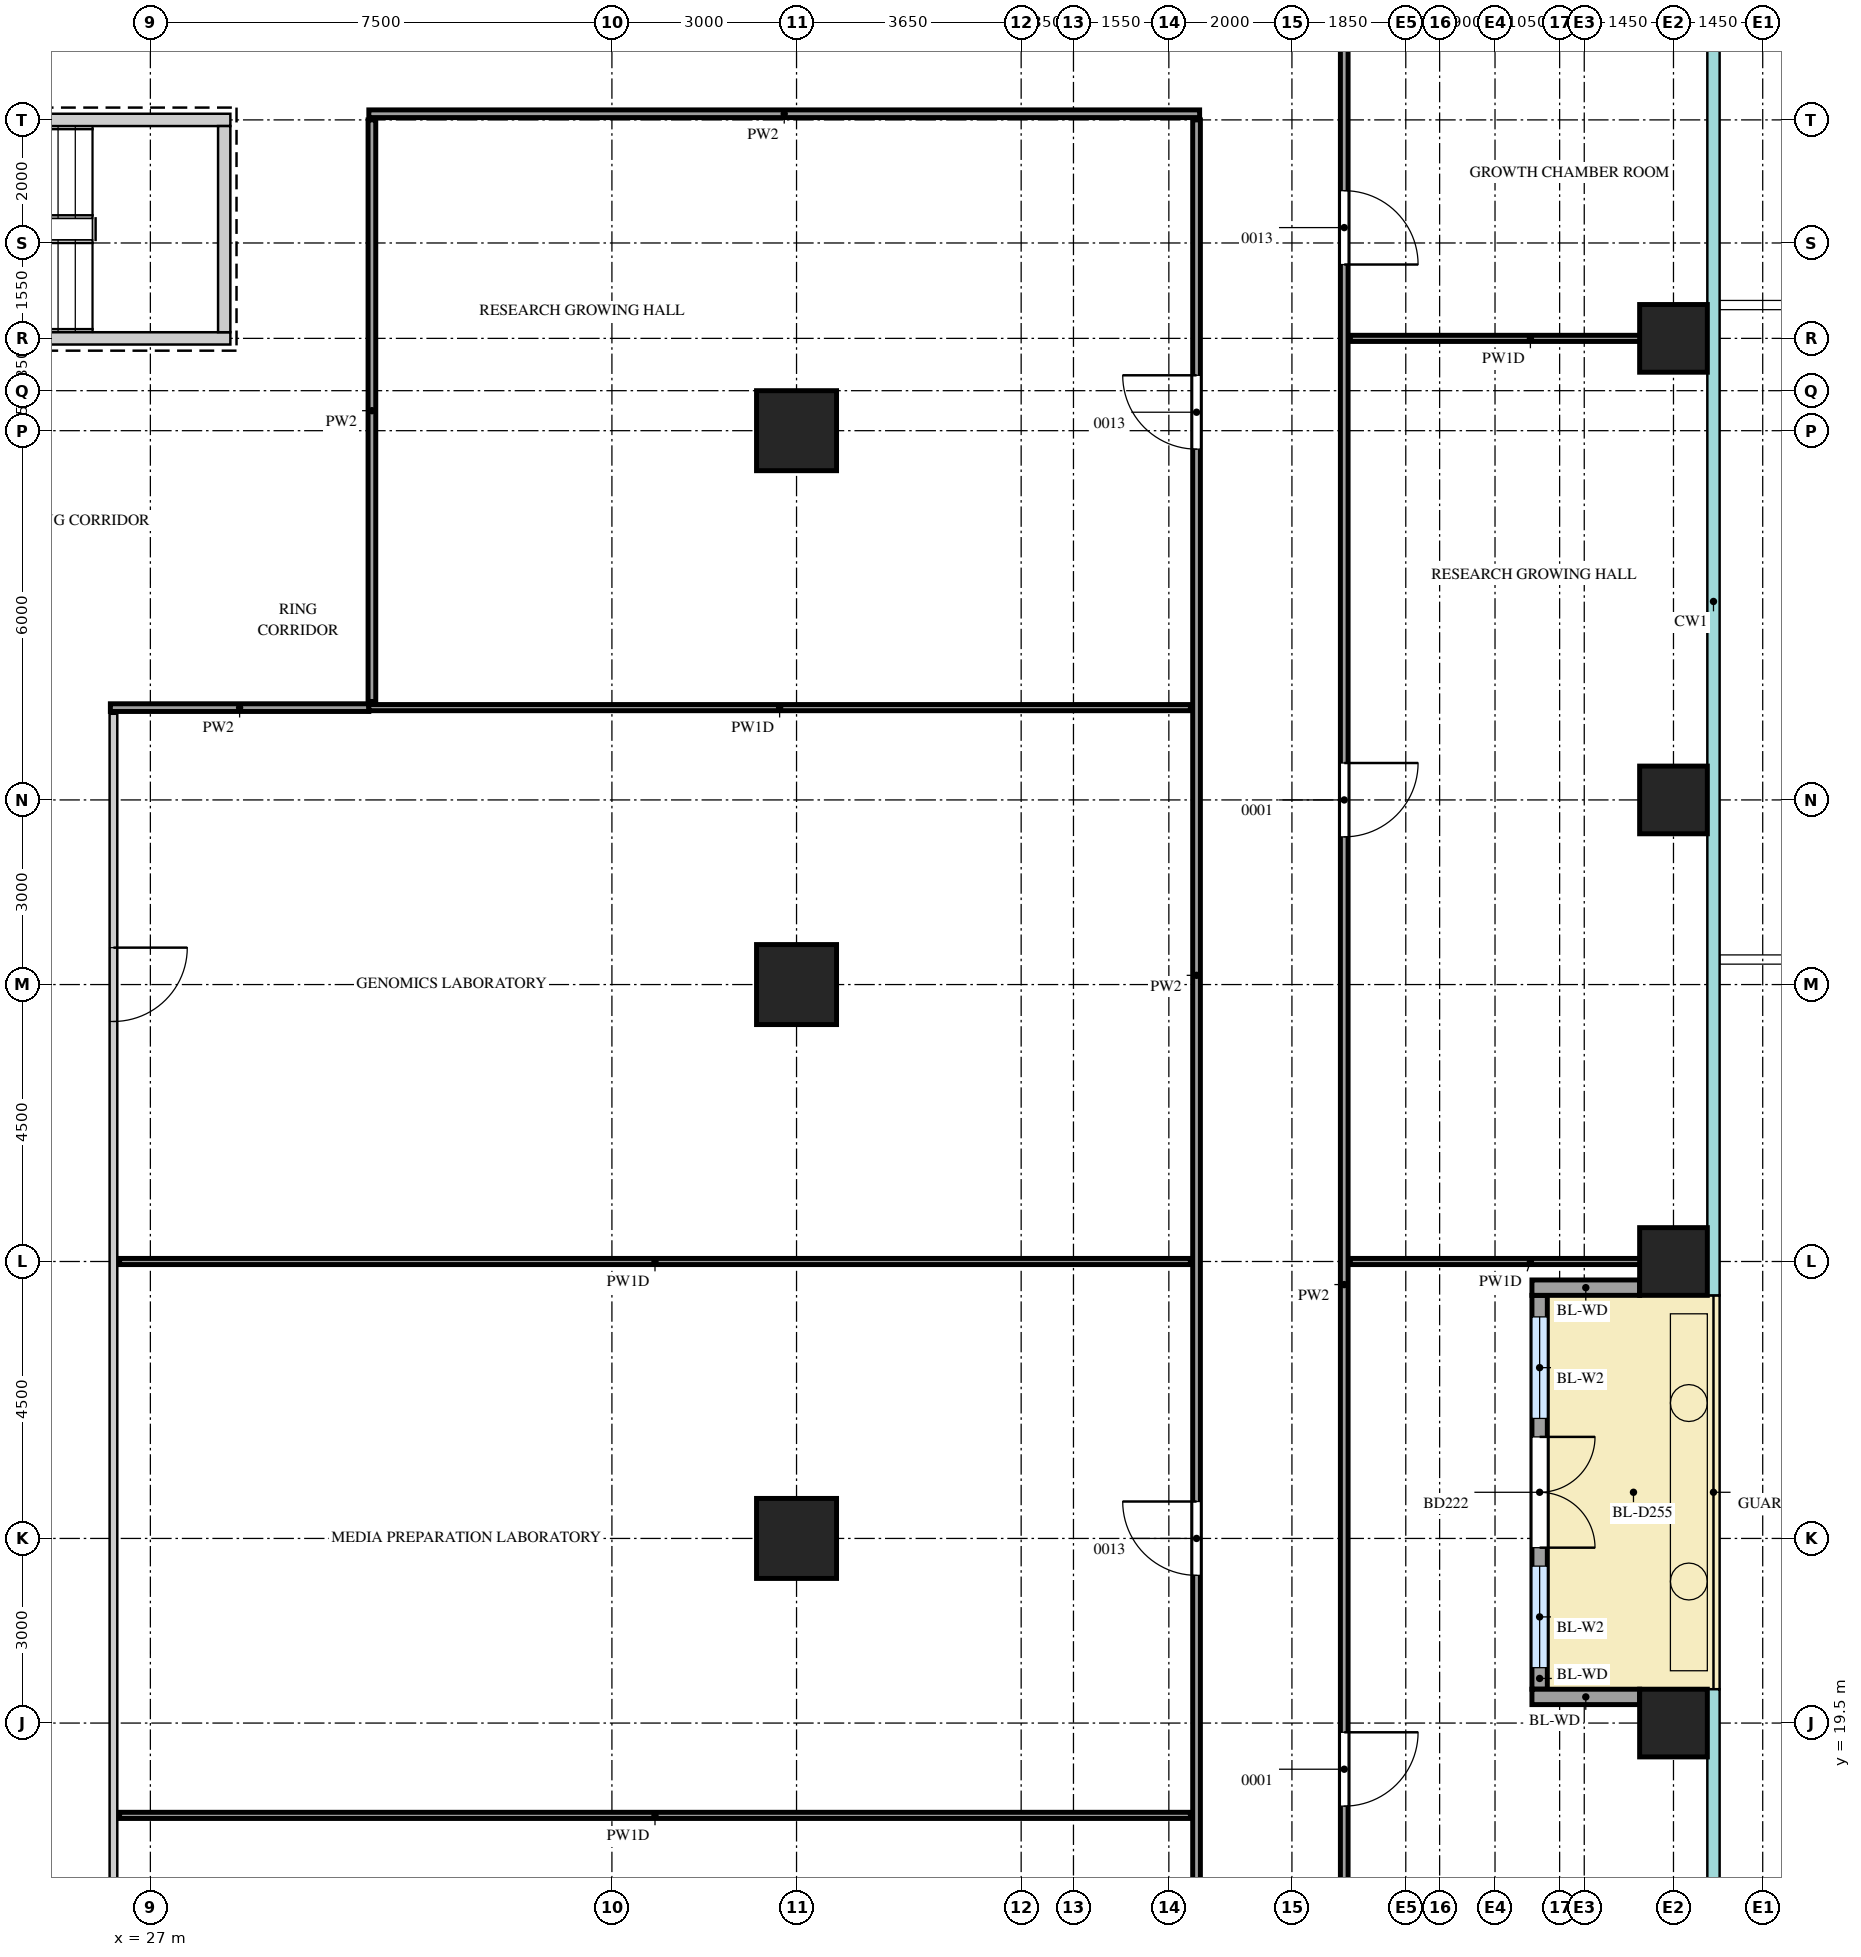
"""IFC4 building model, lengths in metres.
Left out: names, types, materials, properties, quantities, classifications, styles, units other than length and angle.
Written with IfcOpenShell. Run it as: python <this file> out.ifc"""

import sys

from ifc_helpers import new_model, si_unit, direction, frame, frame_2d, origin, origin_2d, place, context, subcontext, project, spatial, rectangle, extrude, source, transform, mapped, element, fill, save


model = new_model("IFC4")
c1 = context("Model", 3, precision=1e-05, world=origin(), true_north=direction((0.0, 1.0)))
c2 = subcontext(c1, "Body", "Model", "MODEL_VIEW")
j1 = project(units=[si_unit("LENGTHUNIT", "METRE"), si_unit("PLANEANGLEUNIT", "RADIAN")], contexts=[c1])
p1 = place(None, origin())
s1 = spatial("IfcSite", under=j1, at=p1, CompositionType="ELEMENT")
p2 = place(p1, origin())
s2 = spatial("IfcBuilding", under=s1, at=p2, CompositionType="ELEMENT")
p3 = place(p2, frame((0.0, 0.0, 105.9)))
s3 = spatial("IfcBuildingStorey", under=s2, at=p3, CompositionType="ELEMENT", Elevation=105.9)
m1 = source(origin(), c2, "Body", "SweptSolid", [
    extrude(rectangle(XDim=7.1, YDim=0.2, at=frame_2d((3.55, 0.0))), origin(), (0.0, 0.0, 1.0), 4.1),
])
p4 = place(p3, frame((21.2, 45.55, 0.0), z_axis=(0.0, 0.0, 1.0), x_axis=(1.0, 0.0, 0.0)))
e1 = element("IfcWall", 1, at=p4, inside=s3, PredefinedType="SHEAR", context=c2, shape_type="MappedRepresentation", body=[
    mapped(m1, transform((0.0, 0.0, 0.0))),
])
m2 = source(origin(), c2, "Body", "SweptSolid", [
    extrude(rectangle(XDim=1.2, YDim=2.1, at=frame_2d((0.6, 1.05))), frame((0.0, 0.11, 0.0), z_axis=(0.0, -1.0, 0.0), x_axis=(1.0, 0.0, 0.0)), (0.0, 0.0, 1.0), 0.22),
])
p5 = place(p4, frame((0.15, 0.0, 0.0)))
e2 = element("IfcOpeningElement", 2, at=p5, cuts=e1, PredefinedType="OPENING", context=c2, shape_type="MappedRepresentation", body=[
    mapped(m2, transform((0.0, 0.0, 0.0))),
])
p6 = place(p3, frame((21.2, 42.0, 0.0), z_axis=(0.0, 0.0, 1.0), x_axis=(1.0, 0.0, 0.0)))
e3 = element("IfcWall", 3, at=p6, inside=s3, PredefinedType="SHEAR", context=c2, shape_type="MappedRepresentation", body=[
    mapped(m1, transform((0.0, 0.0, 0.0))),
])
m3 = source(origin(), c2, "Body", "SweptSolid", [
    extrude(rectangle(XDim=3.35, YDim=0.2, at=frame_2d((1.675, 0.0))), origin(), (0.0, 0.0, 1.0), 4.1),
])
p7 = place(p3, frame((28.2, 42.1, 0.0), z_axis=(0.0, 0.0, 1.0), x_axis=(0.0, 1.0, 0.0)))
e4 = element("IfcWall", 4, at=p7, inside=s3, PredefinedType="SHEAR", context=c2, shape_type="MappedRepresentation", body=[
    mapped(m3, transform((0.0, 0.0, 0.0))),
])
m4 = source(origin(), c2, "Body", "SweptSolid", [
    extrude(rectangle(XDim=1.1, YDim=1.1, at=origin_2d()), origin(), (0.0, 0.0, 1.0), 4.1),
])
for number, where, z_axis, x_axis in (
    (5, (51.75, 19.5, 0.0), (0.0, 0.0, 1.0), (1.0, 0.0, 0.0)),
    (6, (51.75, 27.0, 0.0), (0.0, 0.0, 1.0), (1.0, 0.0, 0.0)),
    (7, (51.75, 34.5, 0.0), (0.0, 0.0, 1.0), (1.0, 0.0, 0.0)),
    (8, (51.75, 42.0, 0.0), (0.0, 0.0, 1.0), (1.0, 0.0, 0.0)),
):
    element("IfcColumn", number, at=place(p3, frame(where, z_axis=z_axis, x_axis=x_axis)), inside=s3, PredefinedType="COLUMN", context=c2, shape_type="MappedRepresentation", body=[
        mapped(m4, transform((0.0, 0.0, 0.0))),
    ])
m5 = source(origin(), c2, "Body", "SweptSolid", [
    extrude(rectangle(XDim=1.3, YDim=1.3, at=origin_2d()), origin(), (0.0, 0.0, 1.0), 4.1),
])
for number, where, z_axis, x_axis in (
    (9, (37.5, 22.5, 0.0), (0.0, 0.0, 1.0), (1.0, 0.0, 0.0)),
    (10, (37.5, 31.5, 0.0), (0.0, 0.0, 1.0), (1.0, 0.0, 0.0)),
    (11, (37.5, 40.5, 0.0), (0.0, 0.0, 1.0), (1.0, 0.0, 0.0)),
):
    element("IfcColumn", number, at=place(p3, frame(where, z_axis=z_axis, x_axis=x_axis)), inside=s3, PredefinedType="COLUMN", context=c2, shape_type="MappedRepresentation", body=[
        mapped(m5, transform((0.0, 0.0, 0.0))),
    ])
m6 = source(origin(), c2, "Body", "SweptSolid", [
    extrude(rectangle(XDim=6.4, YDim=0.25, at=frame_2d((3.2, 0.0))), origin(), (0.0, 0.0, 1.0), 3.55),
])
p8 = place(p3, frame((49.575, 20.05, 0.0), z_axis=(0.0, 0.0, 1.0), x_axis=(0.0, 1.0, 0.0)))
e12 = element("IfcWall", 12, at=p8, inside=s3, PredefinedType="SOLIDWALL", context=c2, shape_type="MappedRepresentation", body=[
    mapped(m6, transform((0.0, 0.0, 0.0))),
])
m7 = source(origin(), c2, "Body", "SweptSolid", [
    extrude(rectangle(XDim=1.65, YDim=2.4, at=frame_2d((0.825, 1.2))), frame((0.0, 0.135, 0.0), z_axis=(0.0, -1.0, 0.0), x_axis=(1.0, 0.0, 0.0)), (0.0, 0.0, 1.0), 0.27),
])
p9 = place(p8, frame((0.35, 0.0, 0.0)))
e13 = element("IfcOpeningElement", 13, at=p9, cuts=e12, PredefinedType="OPENING", context=c2, shape_type="MappedRepresentation", body=[
    mapped(m7, transform((0.0, 0.0, 0.0))),
])
p10 = place(p8, frame((4.4, 0.0, 0.0)))
e14 = element("IfcOpeningElement", 14, at=p10, cuts=e12, PredefinedType="OPENING", context=c2, shape_type="MappedRepresentation", body=[
    mapped(m7, transform((0.0, 0.0, 0.0))),
])
m8 = source(origin(), c2, "Body", "SweptSolid", [
    extrude(rectangle(XDim=1.8, YDim=2.4, at=frame_2d((0.9, 1.2))), frame((0.0, 0.135, 0.0), z_axis=(0.0, -1.0, 0.0), x_axis=(1.0, 0.0, 0.0)), (0.0, 0.0, 1.0), 0.27),
])
p11 = place(p8, frame((2.3, 0.0, 0.0)))
e15 = element("IfcOpeningElement", 15, at=p11, cuts=e12, PredefinedType="OPENING", context=c2, shape_type="MappedRepresentation", body=[
    mapped(m8, transform((0.0, 0.0, 0.0))),
])
m9 = source(origin(), c2, "Body", "SweptSolid", [
    extrude(rectangle(XDim=1.75, YDim=0.25, at=frame_2d((0.875, 0.0))), origin(), (0.0, 0.0, 1.0), 3.55),
])
for number, where, z_axis, x_axis in (
    (16, (51.2, 19.925, 0.0), (0.0, 0.0, 1.0), (-1.0, 0.0, 0.0)),
    (17, (51.2, 26.575, 0.0), (0.0, 0.0, 1.0), (-1.0, 0.0, 0.0)),
):
    element("IfcWall", number, at=place(p3, frame(where, z_axis=z_axis, x_axis=x_axis)), inside=s3, PredefinedType="SOLIDWALL", context=c2, shape_type="MappedRepresentation", body=[
        mapped(m9, transform((0.0, 0.0, 0.0))),
    ])
m10 = source(origin(), c2, "Body", "SweptSolid", [
    extrude(rectangle(XDim=37.65, YDim=0.125, at=frame_2d((18.825, 0.0))), origin(), (0.0, 0.0, 1.0), 4.2),
])
p12 = place(p3, frame((46.4, 10.3, 0.0), z_axis=(0.0, 0.0, 1.0), x_axis=(0.0, 1.0, 0.0)))
e18 = element("IfcWall", 18, at=p12, inside=s3, PredefinedType="PARTITIONING", context=c2, shape_type="MappedRepresentation", body=[
    mapped(m10, transform((0.0, 0.0, 0.0))),
])
m11 = source(origin(), c2, "Body", "SweptSolid", [
    extrude(rectangle(XDim=1.2, YDim=2.1, at=frame_2d((0.6, 1.05))), frame((0.0, 0.073, 0.0), z_axis=(0.0, -1.0, 0.0), x_axis=(1.0, 0.0, 0.0)), (0.0, 0.0, 1.0), 0.145),
])
p13 = place(p12, frame((7.85, 0.0, 0.0)))
e19 = element("IfcOpeningElement", 19, at=p13, cuts=e18, PredefinedType="OPENING", context=c2, shape_type="MappedRepresentation", body=[
    mapped(m11, transform((0.0, 0.0, 0.0))),
])
p14 = place(p12, frame((23.6, 0.0, 0.0)))
e20 = element("IfcOpeningElement", 20, at=p14, cuts=e18, PredefinedType="OPENING", context=c2, shape_type="MappedRepresentation", body=[
    mapped(m11, transform((0.0, 0.0, 0.0))),
])
p15 = place(p12, frame((32.9, 0.0, 0.0)))
e21 = element("IfcOpeningElement", 21, at=p15, cuts=e18, PredefinedType="OPENING", context=c2, shape_type="MappedRepresentation", body=[
    mapped(m11, transform((0.0, 0.0, 0.0))),
])
m12 = source(origin(), c2, "Body", "SweptSolid", [
    extrude(rectangle(XDim=23.2, YDim=0.125, at=frame_2d((11.6, 0.0))), origin(), (0.0, 0.0, 1.0), 4.2),
])
p16 = place(p3, frame((26.4, 12.7, 0.0), z_axis=(0.0, 0.0, 1.0), x_axis=(0.0, 1.0, 0.0)))
e22 = element("IfcWall", 22, at=p16, inside=s3, PredefinedType="PARTITIONING", context=c2, shape_type="MappedRepresentation", body=[
    mapped(m12, transform((0.0, 0.0, 0.0))),
])
m13 = source(origin(), c2, "Body", "SweptSolid", [
    extrude(rectangle(XDim=0.9, YDim=2.1, at=frame_2d((0.45, 1.05))), frame((0.0, 0.073, 0.0), z_axis=(0.0, -1.0, 0.0), x_axis=(1.0, 0.0, 0.0)), (0.0, 0.0, 1.0), 0.145),
])
p17 = place(p16, frame((2.15, 0.0, 0.0)))
e23 = element("IfcOpeningElement", 23, at=p17, cuts=e22, PredefinedType="OPENING", context=c2, shape_type="MappedRepresentation", body=[
    mapped(m13, transform((0.0, 0.0, 0.0))),
])
p18 = place(p16, frame((18.2, 0.0, 0.0)))
e24 = element("IfcOpeningElement", 24, at=p18, cuts=e22, PredefinedType="OPENING", context=c2, shape_type="MappedRepresentation", body=[
    mapped(m11, transform((0.0, 0.0, 0.0))),
])
m14 = source(origin(), c2, "Body", "SweptSolid", [
    extrude(rectangle(XDim=32.85, YDim=0.125, at=frame_2d((16.425, 0.0))), origin(), (0.0, 0.0, 1.0), 4.2),
])
p19 = place(p3, frame((44.0, 12.7, 0.0), z_axis=(0.0, 0.0, 1.0), x_axis=(0.0, 1.0, 0.0)))
e25 = element("IfcWall", 25, at=p19, inside=s3, PredefinedType="PARTITIONING", context=c2, shape_type="MappedRepresentation", body=[
    mapped(m14, transform((0.0, 0.0, 0.0))),
])
p20 = place(p19, frame((9.2, 0.0, 0.0)))
e26 = element("IfcOpeningElement", 26, at=p20, cuts=e25, PredefinedType="OPENING", context=c2, shape_type="MappedRepresentation", body=[
    mapped(m11, transform((0.0, 0.0, 0.0))),
])
p21 = place(p19, frame((27.5, 0.0, 0.0)))
e27 = element("IfcOpeningElement", 27, at=p21, cuts=e25, PredefinedType="OPENING", context=c2, shape_type="MappedRepresentation", body=[
    mapped(m11, transform((0.0, 0.0, 0.0))),
])
m15 = source(origin(), c2, "Body", "SweptSolid", [
    extrude(rectangle(XDim=17.4, YDim=0.1, at=frame_2d((8.7, 0.0))), origin(), (0.0, 0.0, 1.0), 4.2),
])
for number, where, z_axis, x_axis in (
    (28, (26.5, 18.0, 0.0), (0.0, 0.0, 1.0), (1.0, 0.0, 0.0)),
    (29, (26.5, 27.0, 0.0), (0.0, 0.0, 1.0), (1.0, 0.0, 0.0)),
):
    element("IfcWall", number, at=place(p3, frame(where, z_axis=z_axis, x_axis=x_axis)), inside=s3, PredefinedType="PARTITIONING", context=c2, shape_type="MappedRepresentation", body=[
        mapped(m15, transform((0.0, 0.0, 0.0))),
    ])
m16 = source(origin(), c2, "Body", "SweptSolid", [
    extrude(rectangle(XDim=5.85, YDim=0.1, at=frame_2d((2.925, 0.0))), origin(), (0.0, 0.0, 1.0), 4.2),
])
p22 = place(p3, frame((46.5, 27.0, 0.0), z_axis=(0.0, 0.0, 1.0), x_axis=(1.0, 0.0, 0.0)))
e30 = element("IfcWall", 30, at=p22, inside=s3, PredefinedType="PARTITIONING", context=c2, shape_type="MappedRepresentation", body=[
    mapped(m16, transform((0.0, 0.0, 0.0))),
])
m17 = source(origin(), c2, "Body", "SweptSolid", [
    extrude(rectangle(XDim=4.2, YDim=0.125, at=frame_2d((2.1, 0.0))), origin(), (0.0, 0.0, 1.0), 4.2),
])
p23 = place(p3, frame((26.35, 36.0, 0.0), z_axis=(0.0, 0.0, 1.0), x_axis=(1.0, 0.0, 0.0)))
e31 = element("IfcWall", 31, at=p23, inside=s3, PredefinedType="PARTITIONING", context=c2, shape_type="MappedRepresentation", body=[
    mapped(m17, transform((0.0, 0.0, 0.0))),
])
m18 = source(origin(), c2, "Body", "SweptSolid", [
    extrude(rectangle(XDim=13.35, YDim=0.1, at=frame_2d((6.675, 0.0))), origin(), (0.0, 0.0, 1.0), 4.2),
])
p24 = place(p3, frame((30.55, 36.0, 0.0), z_axis=(0.0, 0.0, 1.0), x_axis=(1.0, 0.0, 0.0)))
e32 = element("IfcWall", 32, at=p24, inside=s3, PredefinedType="PARTITIONING", context=c2, shape_type="MappedRepresentation", body=[
    mapped(m18, transform((0.0, 0.0, 0.0))),
])
m19 = source(origin(), c2, "Body", "SweptSolid", [
    extrude(rectangle(XDim=9.45, YDim=0.125, at=frame_2d((4.725, 0.0))), origin(), (0.0, 0.0, 1.0), 4.2),
])
p25 = place(p3, frame((30.6, 36.1, 0.0), z_axis=(0.0, 0.0, 1.0), x_axis=(0.0, 1.0, 0.0)))
e33 = element("IfcWall", 33, at=p25, inside=s3, PredefinedType="PARTITIONING", context=c2, shape_type="MappedRepresentation", body=[
    mapped(m19, transform((0.0, 0.0, 0.0))),
])
p26 = place(p3, frame((46.5, 42.0, 0.0), z_axis=(0.0, 0.0, 1.0), x_axis=(1.0, 0.0, 0.0)))
e34 = element("IfcWall", 34, at=p26, inside=s3, PredefinedType="PARTITIONING", context=c2, shape_type="MappedRepresentation", body=[
    mapped(m16, transform((0.0, 0.0, 0.0))),
])
m20 = source(origin(), c2, "Body", "SweptSolid", [
    extrude(rectangle(XDim=13.5, YDim=0.125, at=frame_2d((6.75, 0.0))), origin(), (0.0, 0.0, 1.0), 4.2),
])
p27 = place(p3, frame((30.55, 45.65, 0.0), z_axis=(0.0, 0.0, 1.0), x_axis=(1.0, 0.0, 0.0)))
e35 = element("IfcWall", 35, at=p27, inside=s3, PredefinedType="PARTITIONING", context=c2, shape_type="MappedRepresentation", body=[
    mapped(m20, transform((0.0, 0.0, 0.0))),
])
m21 = source(origin(), c2, "Body", "SweptSolid", [
    extrude(rectangle(XDim=1.65, YDim=2.4, at=frame_2d((0.825, 1.2))), frame((0.0, 0.03, 0.0), z_axis=(0.0, -1.0, 0.0), x_axis=(1.0, 0.0, 0.0)), (0.0, 0.0, 1.0), 0.06),
])
p28 = place(p9, origin())
e36 = element("IfcWindow", 36, at=p28, inside=s3, PartitioningType="SINGLE_PANEL", PredefinedType="WINDOW", context=c2, shape_type="MappedRepresentation", body=[
    mapped(m21, transform((0.0, 0.0, 0.0))),
])
fill(e13, e36)
p29 = place(p10, origin())
e37 = element("IfcWindow", 37, at=p29, inside=s3, PartitioningType="SINGLE_PANEL", PredefinedType="WINDOW", context=c2, shape_type="MappedRepresentation", body=[
    mapped(m21, transform((0.0, 0.0, 0.0))),
])
fill(e14, e37)
m22 = source(origin(), c2, "Body", "SweptSolid", [
    extrude(rectangle(XDim=1.8, YDim=2.4, at=frame_2d((0.9, 1.2))), frame((0.0, 0.025, 0.0), z_axis=(0.0, -1.0, 0.0), x_axis=(1.0, 0.0, 0.0)), (0.0, 0.0, 1.0), 0.05),
])
p30 = place(p11, origin())
e38 = element("IfcDoor", 38, at=p30, inside=s3, OperationType="DOUBLE_DOOR_DOUBLE_SWING", PredefinedType="DOOR", context=c2, shape_type="MappedRepresentation", body=[
    mapped(m22, transform((0.0, 0.0, 0.0))),
])
fill(e15, e38)
m23 = source(origin(), c2, "Body", "SweptSolid", [
    extrude(rectangle(XDim=1.2, YDim=2.1, at=frame_2d((0.6, 1.05))), frame((0.0, 0.025, 0.0), z_axis=(0.0, -1.0, 0.0), x_axis=(1.0, 0.0, 0.0)), (0.0, 0.0, 1.0), 0.05),
])
p31 = place(p20, origin())
e39 = element("IfcDoor", 39, at=p31, inside=s3, OperationType="SINGLE_SWING_LEFT", PredefinedType="DOOR", context=c2, shape_type="MappedRepresentation", body=[
    mapped(m23, transform((0.0, 0.0, 0.0))),
])
fill(e26, e39)
p32 = place(p18, origin())
e40 = element("IfcDoor", 40, at=p32, inside=s3, OperationType="SINGLE_SWING_RIGHT", PredefinedType="DOOR", context=c2, shape_type="MappedRepresentation", body=[
    mapped(m23, transform((0.0, 0.0, 0.0))),
])
fill(e24, e40)
p33 = place(p21, origin())
e41 = element("IfcDoor", 41, at=p33, inside=s3, OperationType="SINGLE_SWING_LEFT", PredefinedType="DOOR", context=c2, shape_type="MappedRepresentation", body=[
    mapped(m23, transform((0.0, 0.0, 0.0))),
])
fill(e27, e41)
p34 = place(p13, origin())
e42 = element("IfcDoor", 42, at=p34, inside=s3, OperationType="SINGLE_SWING_RIGHT", PredefinedType="DOOR", context=c2, shape_type="MappedRepresentation", body=[
    mapped(m23, transform((0.0, 0.0, 0.0))),
])
fill(e19, e42)
p35 = place(p14, origin())
e43 = element("IfcDoor", 43, at=p35, inside=s3, OperationType="SINGLE_SWING_RIGHT", PredefinedType="DOOR", context=c2, shape_type="MappedRepresentation", body=[
    mapped(m23, transform((0.0, 0.0, 0.0))),
])
fill(e20, e43)
p36 = place(p15, origin())
e44 = element("IfcDoor", 44, at=p36, inside=s3, OperationType="SINGLE_SWING_LEFT", PredefinedType="DOOR", context=c2, shape_type="MappedRepresentation", body=[
    mapped(m23, transform((0.0, 0.0, 0.0))),
])
fill(e21, e44)
save(model, sys.argv[1])
